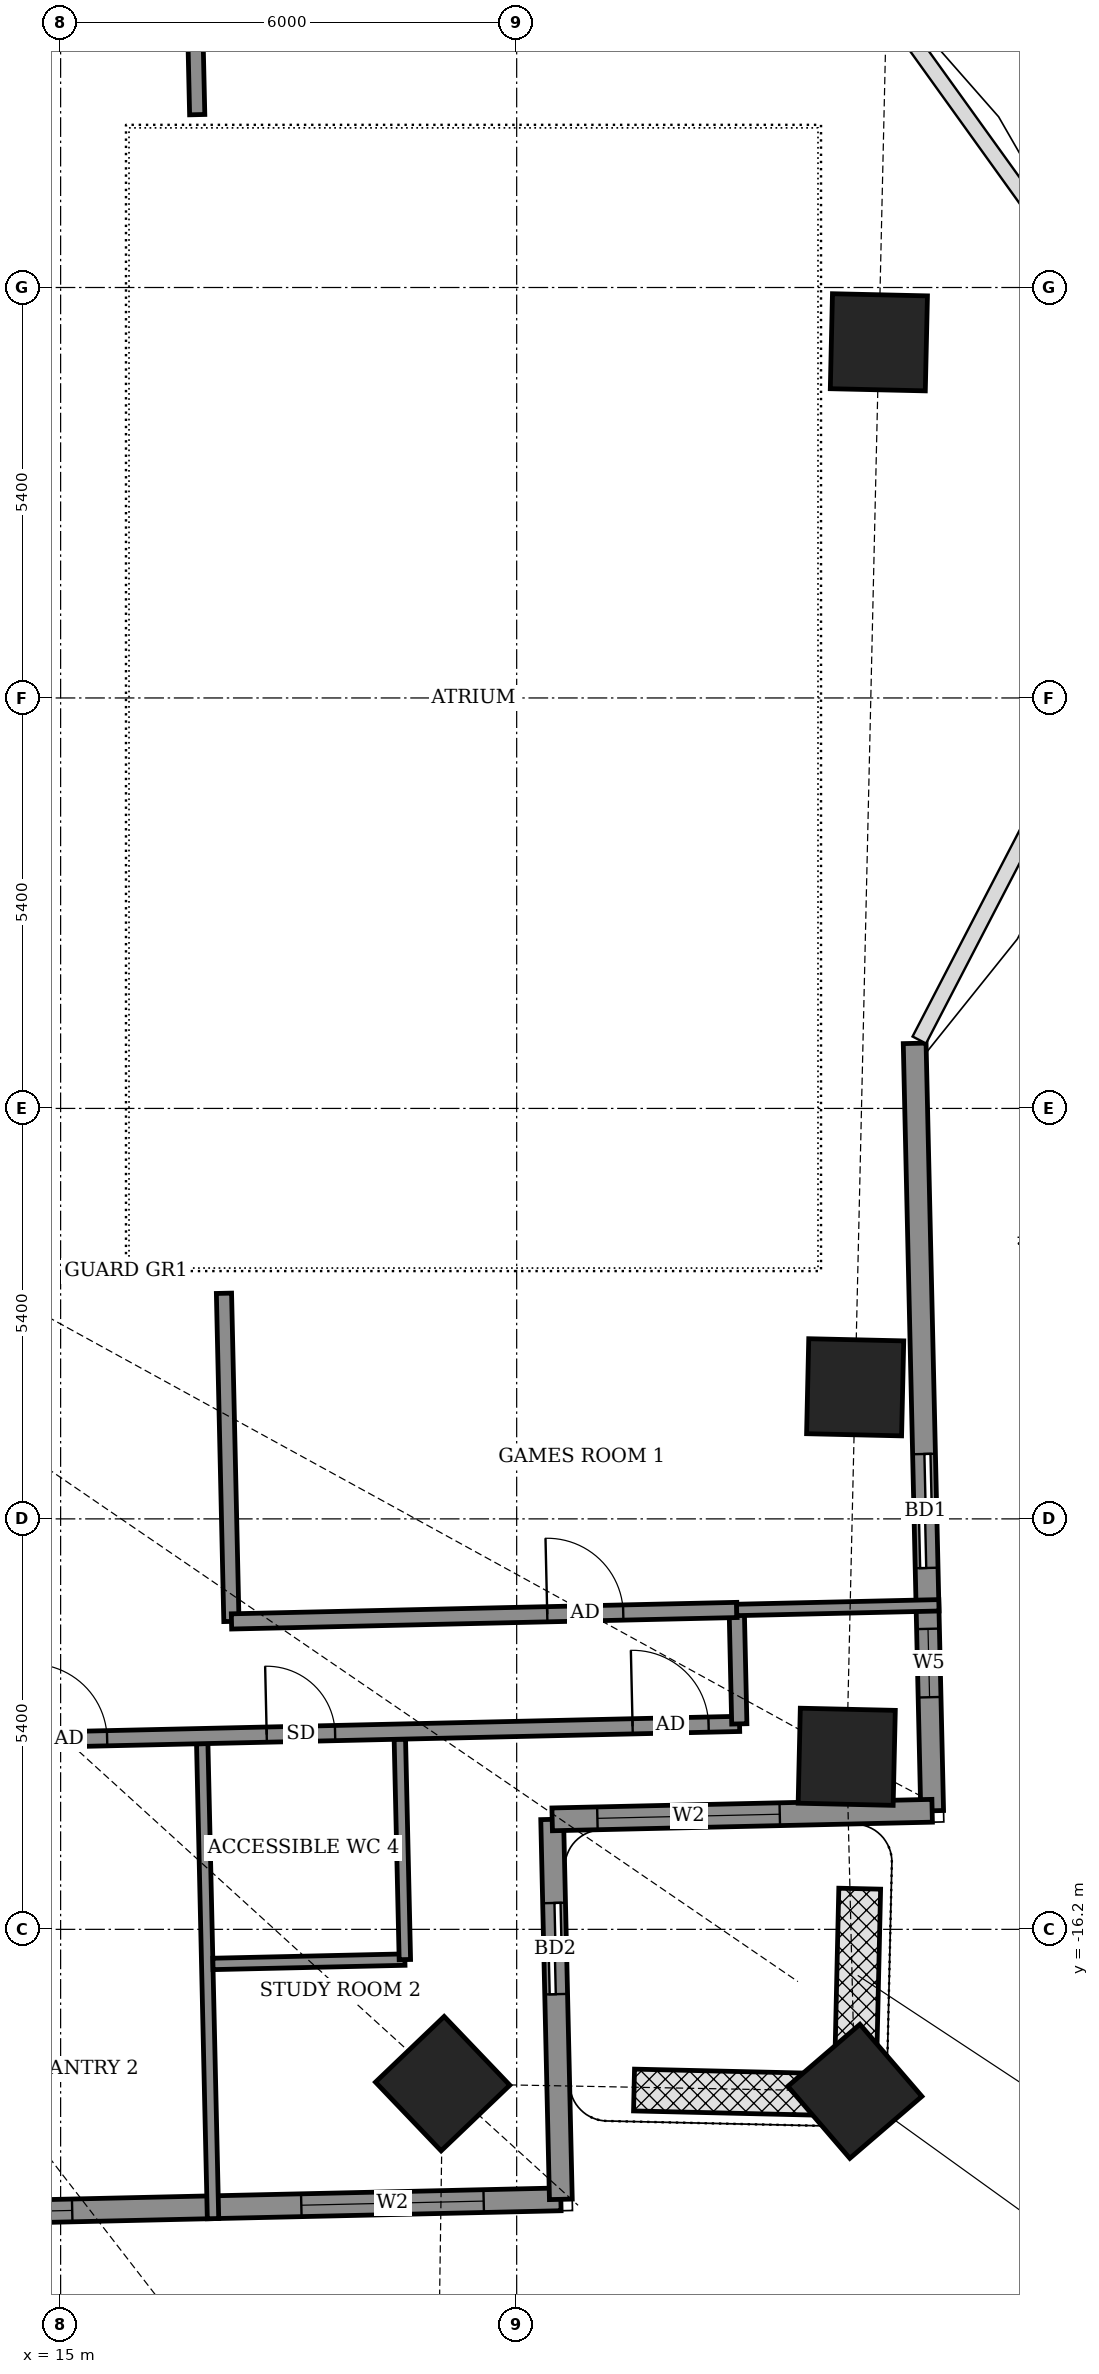
"""IFC4 building model, lengths in metres.
Left out: names, types, materials, properties, quantities, classifications, styles, units other than length and angle.
Written with IfcOpenShell. Run it as: python <this file> out.ifc"""

import sys

from ifc_helpers import new_model, si_unit, direction, frame, frame_2d, origin, origin_2d, place, context, subcontext, project, spatial, rectangle, extrude, element, fill, save


model = new_model("IFC4")
c1 = context("Model", 3, precision=1e-05, world=origin(), true_north=direction((0.0, 1.0)))
c2 = subcontext(c1, "Body", "Model", "MODEL_VIEW")
j1 = project(units=[si_unit("LENGTHUNIT", "METRE"), si_unit("PLANEANGLEUNIT", "RADIAN")], contexts=[c1])
p1 = place(None, origin())
s1 = spatial("IfcSite", under=j1, at=p1, CompositionType="ELEMENT")
p2 = place(p1, origin())
s2 = spatial("IfcBuilding", under=s1, at=p2, CompositionType="ELEMENT")
p3 = place(p2, frame((0.0, 0.0, 170.7)))
s3 = spatial("IfcBuildingStorey", under=s2, at=p3, CompositionType="ELEMENT", Elevation=170.7)
for number, where, z_axis, x_axis in (
    (1, (20.026, -18.23, -0.55), (0.0, 0.0, 1.0), (0.723, 0.691, 0.0)),
    (2, (25.449, -18.331, -0.55), (0.0, 0.0, 1.0), (0.758, 0.652, 0.0)),
    (3, (25.342, -13.93, -0.55), (0.0, 0.0, 1.0), (0.023, 1.0, 0.0)),
    (4, (25.453, -9.069, -0.55), (0.0, 0.0, 1.0), (0.023, 1.0, 0.0)),
    (5, (25.765, 4.679, -0.55), (0.0, 0.0, 1.0), (0.023, 1.0, 0.0)),
):
    element("IfcColumn", number, at=place(p3, frame(where, z_axis=z_axis, x_axis=x_axis)), inside=s3, PredefinedType="COLUMN", context=c2, shape_type="SweptSolid", body=[
        extrude(rectangle(XDim=1.25, YDim=1.25, at=origin_2d()), origin(), (0.0, 0.0, 1.0), 4.6),
    ])
p4 = place(p3, frame((26.466, -14.64, 0.0), z_axis=(0.0, 0.0, 1.0), x_axis=(-0.022773576062, 0.999740648485, 0.0)))
e6 = element("IfcWall", 6, at=p4, inside=s3, PredefinedType="SOLIDWALL", context=c2, shape_type="SweptSolid", body=[
    extrude(rectangle(XDim=10.099, YDim=0.3, at=frame_2d((5.049, 0.0))), origin(), (0.0, 0.0, 1.0), 2.75),
])
p5 = place(p4, frame((1.494, 0.0, 0.9)))
e7 = element("IfcOpeningElement", 7, at=p5, cuts=e6, PredefinedType="OPENING", context=c2, shape_type="SweptSolid", body=[
    extrude(rectangle(XDim=0.9, YDim=1.5, at=frame_2d((0.45, 0.75))), frame((0.0, 0.16, 0.0), z_axis=(0.0, -1.0, 0.0), x_axis=(1.0, 0.0, 0.0)), (0.0, 0.0, 1.0), 0.32),
])
p6 = place(p4, frame((3.195, 0.0, 0.0)))
e8 = element("IfcOpeningElement", 8, at=p6, cuts=e6, PredefinedType="OPENING", context=c2, shape_type="SweptSolid", body=[
    extrude(rectangle(XDim=1.5, YDim=2.4, at=frame_2d((0.75, 1.2))), frame((0.0, 0.16, 0.0), z_axis=(0.0, -1.0, 0.0), x_axis=(1.0, 0.0, 0.0)), (0.0, 0.0, 1.0), 0.32),
])
p7 = place(p3, frame((-18.189, -20.655, 0.0), z_axis=(0.0, 0.0, 1.0), x_axis=(0.999742285265, 0.022701609063, 0.0)))
e9 = element("IfcWall", 9, at=p7, inside=s3, PredefinedType="SOLIDWALL", context=c2, shape_type="SweptSolid", body=[
    extrude(rectangle(XDim=39.78, YDim=0.3, at=frame_2d((19.89, 0.0))), origin(), (0.0, 0.0, 1.0), 2.55),
])
p8 = place(p7, frame((3.325, 0.0, 0.0)))
e10 = element("IfcOpeningElement", 10, at=p8, cuts=e9, PredefinedType="OPENING", context=c2, shape_type="SweptSolid", body=[
    extrude(rectangle(XDim=1.5, YDim=2.4, at=frame_2d((0.75, 1.2))), frame((0.0, 0.16, 0.0), z_axis=(0.0, -1.0, 0.0), x_axis=(1.0, 0.0, 0.0)), (0.0, 0.0, 1.0), 0.32),
])
p9 = place(p7, frame((10.125, 0.0, 0.9)))
e11 = element("IfcOpeningElement", 11, at=p9, cuts=e9, PredefinedType="OPENING", context=c2, shape_type="SweptSolid", body=[
    extrude(rectangle(XDim=2.4, YDim=1.5, at=frame_2d((1.2, 0.75))), frame((0.0, 0.16, 0.0), z_axis=(0.0, -1.0, 0.0), x_axis=(1.0, 0.0, 0.0)), (0.0, 0.0, 1.0), 0.32),
])
p10 = place(p7, frame((16.1, 0.0, 0.0)))
e12 = element("IfcOpeningElement", 12, at=p10, cuts=e9, PredefinedType="OPENING", context=c2, shape_type="SweptSolid", body=[
    extrude(rectangle(XDim=1.5, YDim=2.4, at=frame_2d((0.75, 1.2))), frame((0.0, 0.16, 0.0), z_axis=(0.0, -1.0, 0.0), x_axis=(1.0, 0.0, 0.0)), (0.0, 0.0, 1.0), 0.32),
])
p11 = place(p7, frame((21.1, 0.0, 0.0)))
e13 = element("IfcOpeningElement", 13, at=p11, cuts=e9, PredefinedType="OPENING", context=c2, shape_type="SweptSolid", body=[
    extrude(rectangle(XDim=1.5, YDim=2.4, at=frame_2d((0.75, 1.2))), frame((0.0, 0.16, 0.0), z_axis=(0.0, -1.0, 0.0), x_axis=(1.0, 0.0, 0.0)), (0.0, 0.0, 1.0), 0.32),
])
p12 = place(p7, frame((25.525, 0.0, 0.9)))
e14 = element("IfcOpeningElement", 14, at=p12, cuts=e9, PredefinedType="OPENING", context=c2, shape_type="SweptSolid", body=[
    extrude(rectangle(XDim=2.4, YDim=1.5, at=frame_2d((1.2, 0.75))), frame((0.0, 0.16, 0.0), z_axis=(0.0, -1.0, 0.0), x_axis=(1.0, 0.0, 0.0)), (0.0, 0.0, 1.0), 0.32),
])
p13 = place(p7, frame((30.95, 0.0, 0.9)))
e15 = element("IfcOpeningElement", 15, at=p13, cuts=e9, PredefinedType="OPENING", context=c2, shape_type="SweptSolid", body=[
    extrude(rectangle(XDim=2.4, YDim=1.5, at=frame_2d((1.2, 0.75))), frame((0.0, 0.16, 0.0), z_axis=(0.0, -1.0, 0.0), x_axis=(1.0, 0.0, 0.0)), (0.0, 0.0, 1.0), 0.32),
])
p14 = place(p7, frame((36.365, 0.0, 0.9)))
e16 = element("IfcOpeningElement", 16, at=p14, cuts=e9, PredefinedType="OPENING", context=c2, shape_type="SweptSolid", body=[
    extrude(rectangle(XDim=2.4, YDim=1.5, at=frame_2d((1.2, 0.75))), frame((0.0, 0.16, 0.0), z_axis=(0.0, -1.0, 0.0), x_axis=(1.0, 0.0, 0.0)), (0.0, 0.0, 1.0), 0.32),
])
p15 = place(p3, frame((21.581, -19.752, 0.0), z_axis=(0.0, 0.0, 1.0), x_axis=(-0.022801259434, 0.999740017489, 0.0)))
e17 = element("IfcWall", 17, at=p15, inside=s3, PredefinedType="SOLIDWALL", context=c2, shape_type="SweptSolid", body=[
    extrude(rectangle(XDim=5.0, YDim=0.3, at=frame_2d((2.5, 0.0))), origin(), (0.0, 0.0, 1.0), 2.75),
])
p16 = place(p15, frame((2.7, 0.0, 0.0)))
e18 = element("IfcOpeningElement", 18, at=p16, cuts=e17, PredefinedType="OPENING", context=c2, shape_type="SweptSolid", body=[
    extrude(rectangle(XDim=1.2, YDim=2.4, at=frame_2d((0.6, 1.2))), frame((0.0, 0.16, 0.0), z_axis=(0.0, -1.0, 0.0), x_axis=(1.0, 0.0, 0.0)), (0.0, 0.0, 1.0), 0.32),
])
p17 = place(p3, frame((21.467, -14.753, 0.0), z_axis=(0.0, 0.0, 1.0), x_axis=(0.999744450377, 0.022606059803, 0.0)))
e19 = element("IfcWall", 19, at=p17, inside=s3, PredefinedType="SOLIDWALL", context=c2, shape_type="SweptSolid", body=[
    extrude(rectangle(XDim=5.0, YDim=0.3, at=frame_2d((2.5, 0.0))), origin(), (0.0, 0.0, 1.0), 2.75),
])
p18 = place(p17, frame((0.595, 0.0, 0.9)))
e20 = element("IfcOpeningElement", 20, at=p18, cuts=e19, PredefinedType="OPENING", context=c2, shape_type="SweptSolid", body=[
    extrude(rectangle(XDim=2.4, YDim=1.5, at=frame_2d((1.2, 0.75))), frame((0.0, 0.16, 0.0), z_axis=(0.0, -1.0, 0.0), x_axis=(1.0, 0.0, 0.0)), (0.0, 0.0, 1.0), 0.32),
])
p19 = place(p3, frame((25.017, -18.371, 0.0), z_axis=(0.0, 0.0, 1.0), x_axis=(-0.999733308565, 0.023093543357, 0.0)))
e21 = element("IfcWall", 21, at=p19, inside=s3, PredefinedType="USERDEFINED", context=c2, shape_type="SweptSolid", body=[
    extrude(rectangle(XDim=2.474, YDim=0.55, at=frame_2d((1.237, 0.0))), origin(), (0.0, 0.0, 1.0), 0.8),
])
p20 = place(p3, frame((25.513, -15.665, 0.0), z_axis=(0.0, 0.0, 1.0), x_axis=(-0.022791894382, -0.999740231035, 0.0)))
e22 = element("IfcWall", 22, at=p20, inside=s3, PredefinedType="USERDEFINED", context=c2, shape_type="SweptSolid", body=[
    extrude(rectangle(XDim=2.281, YDim=0.55, at=frame_2d((1.141, 0.0))), origin(), (0.0, 0.0, 1.0), 0.8),
])
p21 = place(p3, frame((17.005, -20.006, 0.0), z_axis=(0.0, 0.0, 1.0), x_axis=(-0.022696558861, 0.999742399929, 0.0)))
e23 = element("IfcWall", 23, at=p21, inside=s3, PredefinedType="PARTITIONING", context=c2, shape_type="SweptSolid", body=[
    extrude(rectangle(XDim=6.25, YDim=0.15, at=frame_2d((3.125, 0.0))), origin(), (0.0, 0.0, 1.0), 2.85),
])
p22 = place(p3, frame((17.004, -16.655, 0.0), z_axis=(0.0, 0.0, 1.0), x_axis=(0.999744175585, 0.022618209135, 0.0)))
e24 = element("IfcWall", 24, at=p22, inside=s3, PredefinedType="PARTITIONING", context=c2, shape_type="SweptSolid", body=[
    extrude(rectangle(XDim=2.526, YDim=0.15, at=frame_2d((1.263, 0.0))), origin(), (0.0, 0.0, 1.0), 2.85),
])
p23 = place(p3, frame((19.529, -16.598, 0.0), z_axis=(0.0, 0.0, 1.0), x_axis=(-0.022817032779, 0.999739657619, 0.0)))
e25 = element("IfcWall", 25, at=p23, inside=s3, PredefinedType="PARTITIONING", context=c2, shape_type="SweptSolid", body=[
    extrude(rectangle(XDim=2.9, YDim=0.15, at=frame_2d((1.45, 0.0))), origin(), (0.0, 0.0, 1.0), 2.75),
])
p24 = place(p3, frame((-16.645, -14.418, 0.0), z_axis=(0.0, 0.0, 1.0), x_axis=(0.999742564802, 0.022689295346, 0.0)))
e26 = element("IfcWall", 26, at=p24, inside=s3, PredefinedType="PARTITIONING", context=c2, shape_type="SweptSolid", body=[
    extrude(rectangle(XDim=40.587, YDim=0.2, at=frame_2d((20.294, 0.0))), origin(), (0.0, 0.0, 1.0), 2.55),
])
p25 = place(p24, frame((4.965, 0.0, 0.0)))
e27 = element("IfcOpeningElement", 27, at=p25, cuts=e26, PredefinedType="OPENING", context=c2, shape_type="SweptSolid", body=[
    extrude(rectangle(XDim=0.9, YDim=2.1, at=frame_2d((0.45, 1.05))), frame((0.0, 0.11, 0.0), z_axis=(0.0, -1.0, 0.0), x_axis=(1.0, 0.0, 0.0)), (0.0, 0.0, 1.0), 0.22),
])
p26 = place(p24, frame((10.44, 0.0, 0.0)))
e28 = element("IfcOpeningElement", 28, at=p26, cuts=e26, PredefinedType="OPENING", context=c2, shape_type="SweptSolid", body=[
    extrude(rectangle(XDim=1.0, YDim=2.1, at=frame_2d((0.5, 1.05))), frame((0.0, 0.11, 0.0), z_axis=(0.0, -1.0, 0.0), x_axis=(1.0, 0.0, 0.0)), (0.0, 0.0, 1.0), 0.22),
])
p27 = place(p24, frame((7.465, 0.0, 0.0)))
e29 = element("IfcOpeningElement", 29, at=p27, cuts=e26, PredefinedType="OPENING", context=c2, shape_type="SweptSolid", body=[
    extrude(rectangle(XDim=0.9, YDim=2.1, at=frame_2d((0.45, 1.05))), frame((0.0, 0.11, 0.0), z_axis=(0.0, -1.0, 0.0), x_axis=(1.0, 0.0, 0.0)), (0.0, 0.0, 1.0), 0.22),
])
p28 = place(p24, frame((13.515, 0.0, 0.0)))
e30 = element("IfcOpeningElement", 30, at=p28, cuts=e26, PredefinedType="OPENING", context=c2, shape_type="SweptSolid", body=[
    extrude(rectangle(XDim=0.9, YDim=2.1, at=frame_2d((0.45, 1.05))), frame((0.0, 0.11, 0.0), z_axis=(0.0, -1.0, 0.0), x_axis=(1.0, 0.0, 0.0)), (0.0, 0.0, 1.0), 0.22),
])
p29 = place(p24, frame((20.915, 0.0, 0.0)))
e31 = element("IfcOpeningElement", 31, at=p29, cuts=e26, PredefinedType="OPENING", context=c2, shape_type="SweptSolid", body=[
    extrude(rectangle(XDim=0.9, YDim=2.1, at=frame_2d((0.45, 1.05))), frame((0.0, 0.11, 0.0), z_axis=(0.0, -1.0, 0.0), x_axis=(1.0, 0.0, 0.0)), (0.0, 0.0, 1.0), 0.22),
])
p30 = place(p24, frame((23.24, 0.0, 0.0)))
e32 = element("IfcOpeningElement", 32, at=p30, cuts=e26, PredefinedType="OPENING", context=c2, shape_type="SweptSolid", body=[
    extrude(rectangle(XDim=1.0, YDim=2.1, at=frame_2d((0.5, 1.05))), frame((0.0, 0.11, 0.0), z_axis=(0.0, -1.0, 0.0), x_axis=(1.0, 0.0, 0.0)), (0.0, 0.0, 1.0), 0.22),
])
p31 = place(p24, frame((25.665, 0.0, 0.0)))
e33 = element("IfcOpeningElement", 33, at=p31, cuts=e26, PredefinedType="OPENING", context=c2, shape_type="SweptSolid", body=[
    extrude(rectangle(XDim=0.9, YDim=2.1, at=frame_2d((0.45, 1.05))), frame((0.0, 0.11, 0.0), z_axis=(0.0, -1.0, 0.0), x_axis=(1.0, 0.0, 0.0)), (0.0, 0.0, 1.0), 0.22),
])
p32 = place(p24, frame((31.265, 0.0, 0.0)))
e34 = element("IfcOpeningElement", 34, at=p32, cuts=e26, PredefinedType="OPENING", context=c2, shape_type="SweptSolid", body=[
    extrude(rectangle(XDim=1.0, YDim=2.1, at=frame_2d((0.5, 1.05))), frame((0.0, 0.11, 0.0), z_axis=(0.0, -1.0, 0.0), x_axis=(1.0, 0.0, 0.0)), (0.0, 0.0, 1.0), 0.22),
])
p33 = place(p24, frame((28.265, 0.0, 0.0)))
e35 = element("IfcOpeningElement", 35, at=p33, cuts=e26, PredefinedType="OPENING", context=c2, shape_type="SweptSolid", body=[
    extrude(rectangle(XDim=0.9, YDim=2.1, at=frame_2d((0.45, 1.05))), frame((0.0, 0.11, 0.0), z_axis=(0.0, -1.0, 0.0), x_axis=(1.0, 0.0, 0.0)), (0.0, 0.0, 1.0), 0.22),
])
p34 = place(p24, frame((39.18, 0.0, 0.0)))
e36 = element("IfcOpeningElement", 36, at=p34, cuts=e26, PredefinedType="OPENING", context=c2, shape_type="SweptSolid", body=[
    extrude(rectangle(XDim=1.0, YDim=2.1, at=frame_2d((0.5, 1.05))), frame((0.0, 0.11, 0.0), z_axis=(0.0, -1.0, 0.0), x_axis=(1.0, 0.0, 0.0)), (0.0, 0.0, 1.0), 0.22),
])
p35 = place(p24, frame((34.365, 0.0, 0.0)))
e37 = element("IfcOpeningElement", 37, at=p35, cuts=e26, PredefinedType="OPENING", context=c2, shape_type="SweptSolid", body=[
    extrude(rectangle(XDim=0.9, YDim=2.1, at=frame_2d((0.45, 1.05))), frame((0.0, 0.11, 0.0), z_axis=(0.0, -1.0, 0.0), x_axis=(1.0, 0.0, 0.0)), (0.0, 0.0, 1.0), 0.22),
])
p36 = place(p3, frame((23.929, -13.497, 0.0), z_axis=(0.0, 0.0, 1.0), x_axis=(-0.022632637625, 0.99974384905, 0.0)))
e38 = element("IfcWall", 38, at=p36, inside=s3, PredefinedType="PARTITIONING", context=c2, shape_type="SweptSolid", body=[
    extrude(rectangle(XDim=1.5, YDim=0.2, at=frame_2d((0.75, 0.0))), origin(), (0.0, 0.0, 1.0), 2.75),
])
p37 = place(p3, frame((17.247, -12.149, 0.0), z_axis=(0.0, 0.0, 1.0), x_axis=(-0.022729111383, 0.999741660378, 0.0)))
e39 = element("IfcWall", 39, at=p37, inside=s3, PredefinedType="PARTITIONING", context=c2, shape_type="SweptSolid", body=[
    extrude(rectangle(XDim=4.318, YDim=0.2, at=frame_2d((2.159, 0.0))), origin(), (0.0, 0.0, 1.0), 2.75),
])
p38 = place(p3, frame((17.248, -12.149, 0.0), z_axis=(0.0, 0.0, 1.0), x_axis=(0.999742706457, 0.022683052816, 0.0)))
e40 = element("IfcWall", 40, at=p38, inside=s3, PredefinedType="PARTITIONING", context=c2, shape_type="SweptSolid", body=[
    extrude(rectangle(XDim=6.652, YDim=0.2, at=frame_2d((3.326, 0.0))), origin(), (0.0, 0.0, 1.0), 2.75),
])
p39 = place(p38, frame((4.155, 0.0, 0.0)))
e41 = element("IfcOpeningElement", 41, at=p39, cuts=e40, PredefinedType="OPENING", context=c2, shape_type="SweptSolid", body=[
    extrude(rectangle(XDim=1.0, YDim=2.1, at=frame_2d((0.5, 1.05))), frame((0.0, 0.11, 0.0), z_axis=(0.0, -1.0, 0.0), x_axis=(1.0, 0.0, 0.0)), (0.0, 0.0, 1.0), 0.22),
])
p40 = place(p3, frame((23.894, -11.998, 0.0), z_axis=(0.0, 0.0, 1.0), x_axis=(0.9997370305, 0.022931852246, 0.0)))
e42 = element("IfcWall", 42, at=p40, inside=s3, PredefinedType="PARTITIONING", context=c2, shape_type="SweptSolid", body=[
    extrude(rectangle(XDim=2.662, YDim=0.15, at=frame_2d((1.331, 0.0))), origin(), (0.0, 0.0, 1.0), 2.75),
])
p41 = place(p3, frame((16.797, 7.674, 0.0), z_axis=(0.0, 0.0, 1.0), x_axis=(-0.022698399288, 0.999742358145, 0.0)))
e43 = element("IfcWall", 43, at=p41, inside=s3, PredefinedType="PARTITIONING", context=c2, shape_type="SweptSolid", body=[
    extrude(rectangle(XDim=8.196, YDim=0.2, at=frame_2d((4.098, 0.0))), origin(), (0.0, 0.0, 1.0), 2.65),
])
p42 = place(p41, frame((3.683, 0.0, 0.0)))
e44 = element("IfcOpeningElement", 44, at=p42, cuts=e43, PredefinedType="OPENING", context=c2, shape_type="SweptSolid", body=[
    extrude(rectangle(XDim=1.0, YDim=2.1, at=frame_2d((0.5, 1.05))), frame((0.0, 0.11, 0.0), z_axis=(0.0, -1.0, 0.0), x_axis=(1.0, 0.0, 0.0)), (0.0, 0.0, 1.0), 0.22),
])
p43 = place(p5, origin())
e45 = element("IfcWindow", 45, at=p43, inside=s3, PartitioningType="SINGLE_PANEL", PredefinedType="WINDOW", context=c2, shape_type="SweptSolid", body=[
    extrude(rectangle(XDim=0.9, YDim=1.5, at=frame_2d((0.45, 0.75))), frame((0.0, 0.03, 0.0), z_axis=(0.0, -1.0, 0.0), x_axis=(1.0, 0.0, 0.0)), (0.0, 0.0, 1.0), 0.06),
])
fill(e7, e45)
p44 = place(p6, origin())
e46 = element("IfcDoor", 46, at=p44, inside=s3, OperationType="SLIDING_TO_LEFT", PredefinedType="DOOR", context=c2, shape_type="SweptSolid", body=[
    extrude(rectangle(XDim=1.5, YDim=2.4, at=frame_2d((0.75, 1.2))), frame((0.0, 0.025, 0.0), z_axis=(0.0, -1.0, 0.0), x_axis=(1.0, 0.0, 0.0)), (0.0, 0.0, 1.0), 0.05),
])
fill(e8, e46)
p45 = place(p13, origin())
e47 = element("IfcWindow", 47, at=p45, inside=s3, PartitioningType="DOUBLE_PANEL_VERTICAL", PredefinedType="WINDOW", context=c2, shape_type="SweptSolid", body=[
    extrude(rectangle(XDim=2.4, YDim=1.5, at=frame_2d((1.2, 0.75))), frame((0.0, 0.03, 0.0), z_axis=(0.0, -1.0, 0.0), x_axis=(1.0, 0.0, 0.0)), (0.0, 0.0, 1.0), 0.06),
])
fill(e15, e47)
p46 = place(p14, origin())
e48 = element("IfcWindow", 48, at=p46, inside=s3, PartitioningType="DOUBLE_PANEL_VERTICAL", PredefinedType="WINDOW", context=c2, shape_type="SweptSolid", body=[
    extrude(rectangle(XDim=2.4, YDim=1.5, at=frame_2d((1.2, 0.75))), frame((0.0, 0.03, 0.0), z_axis=(0.0, -1.0, 0.0), x_axis=(1.0, 0.0, 0.0)), (0.0, 0.0, 1.0), 0.06),
])
fill(e16, e48)
p47 = place(p16, origin())
e49 = element("IfcDoor", 49, at=p47, inside=s3, OperationType="SLIDING_TO_LEFT", PredefinedType="DOOR", context=c2, shape_type="SweptSolid", body=[
    extrude(rectangle(XDim=1.2, YDim=2.4, at=frame_2d((0.6, 1.2))), frame((0.0, 0.025, 0.0), z_axis=(0.0, -1.0, 0.0), x_axis=(1.0, 0.0, 0.0)), (0.0, 0.0, 1.0), 0.05),
])
fill(e18, e49)
p48 = place(p18, origin())
e50 = element("IfcWindow", 50, at=p48, inside=s3, PartitioningType="DOUBLE_PANEL_VERTICAL", PredefinedType="WINDOW", context=c2, shape_type="SweptSolid", body=[
    extrude(rectangle(XDim=2.4, YDim=1.5, at=frame_2d((1.2, 0.75))), frame((0.0, 0.03, 0.0), z_axis=(0.0, -1.0, 0.0), x_axis=(1.0, 0.0, 0.0)), (0.0, 0.0, 1.0), 0.06),
])
fill(e20, e50)
p49 = place(p32, origin())
e51 = element("IfcDoor", 51, at=p49, inside=s3, OperationType="SINGLE_SWING_RIGHT", PredefinedType="DOOR", context=c2, shape_type="SweptSolid", body=[
    extrude(rectangle(XDim=1.0, YDim=2.1, at=frame_2d((0.5, 1.05))), frame((0.0, 0.025, 0.0), z_axis=(0.0, -1.0, 0.0), x_axis=(1.0, 0.0, 0.0)), (0.0, 0.0, 1.0), 0.05),
])
fill(e34, e51)
p50 = place(p34, origin())
e52 = element("IfcDoor", 52, at=p50, inside=s3, OperationType="SINGLE_SWING_LEFT", PredefinedType="DOOR", context=c2, shape_type="SweptSolid", body=[
    extrude(rectangle(XDim=1.0, YDim=2.1, at=frame_2d((0.5, 1.05))), frame((0.0, 0.025, 0.0), z_axis=(0.0, -1.0, 0.0), x_axis=(1.0, 0.0, 0.0)), (0.0, 0.0, 1.0), 0.05),
])
fill(e36, e52)
p51 = place(p35, origin())
e53 = element("IfcDoor", 53, at=p51, inside=s3, OperationType="SINGLE_SWING_LEFT", PredefinedType="DOOR", context=c2, shape_type="SweptSolid", body=[
    extrude(rectangle(XDim=0.9, YDim=2.1, at=frame_2d((0.45, 1.05))), frame((0.0, 0.025, 0.0), z_axis=(0.0, -1.0, 0.0), x_axis=(1.0, 0.0, 0.0)), (0.0, 0.0, 1.0), 0.05),
])
fill(e37, e53)
p52 = place(p39, origin())
e54 = element("IfcDoor", 54, at=p52, inside=s3, OperationType="SINGLE_SWING_RIGHT", PredefinedType="DOOR", context=c2, shape_type="SweptSolid", body=[
    extrude(rectangle(XDim=1.0, YDim=2.1, at=frame_2d((0.5, 1.05))), frame((0.0, 0.025, 0.0), z_axis=(0.0, -1.0, 0.0), x_axis=(1.0, 0.0, 0.0)), (0.0, 0.0, 1.0), 0.05),
])
fill(e41, e54)
save(model, sys.argv[1])
